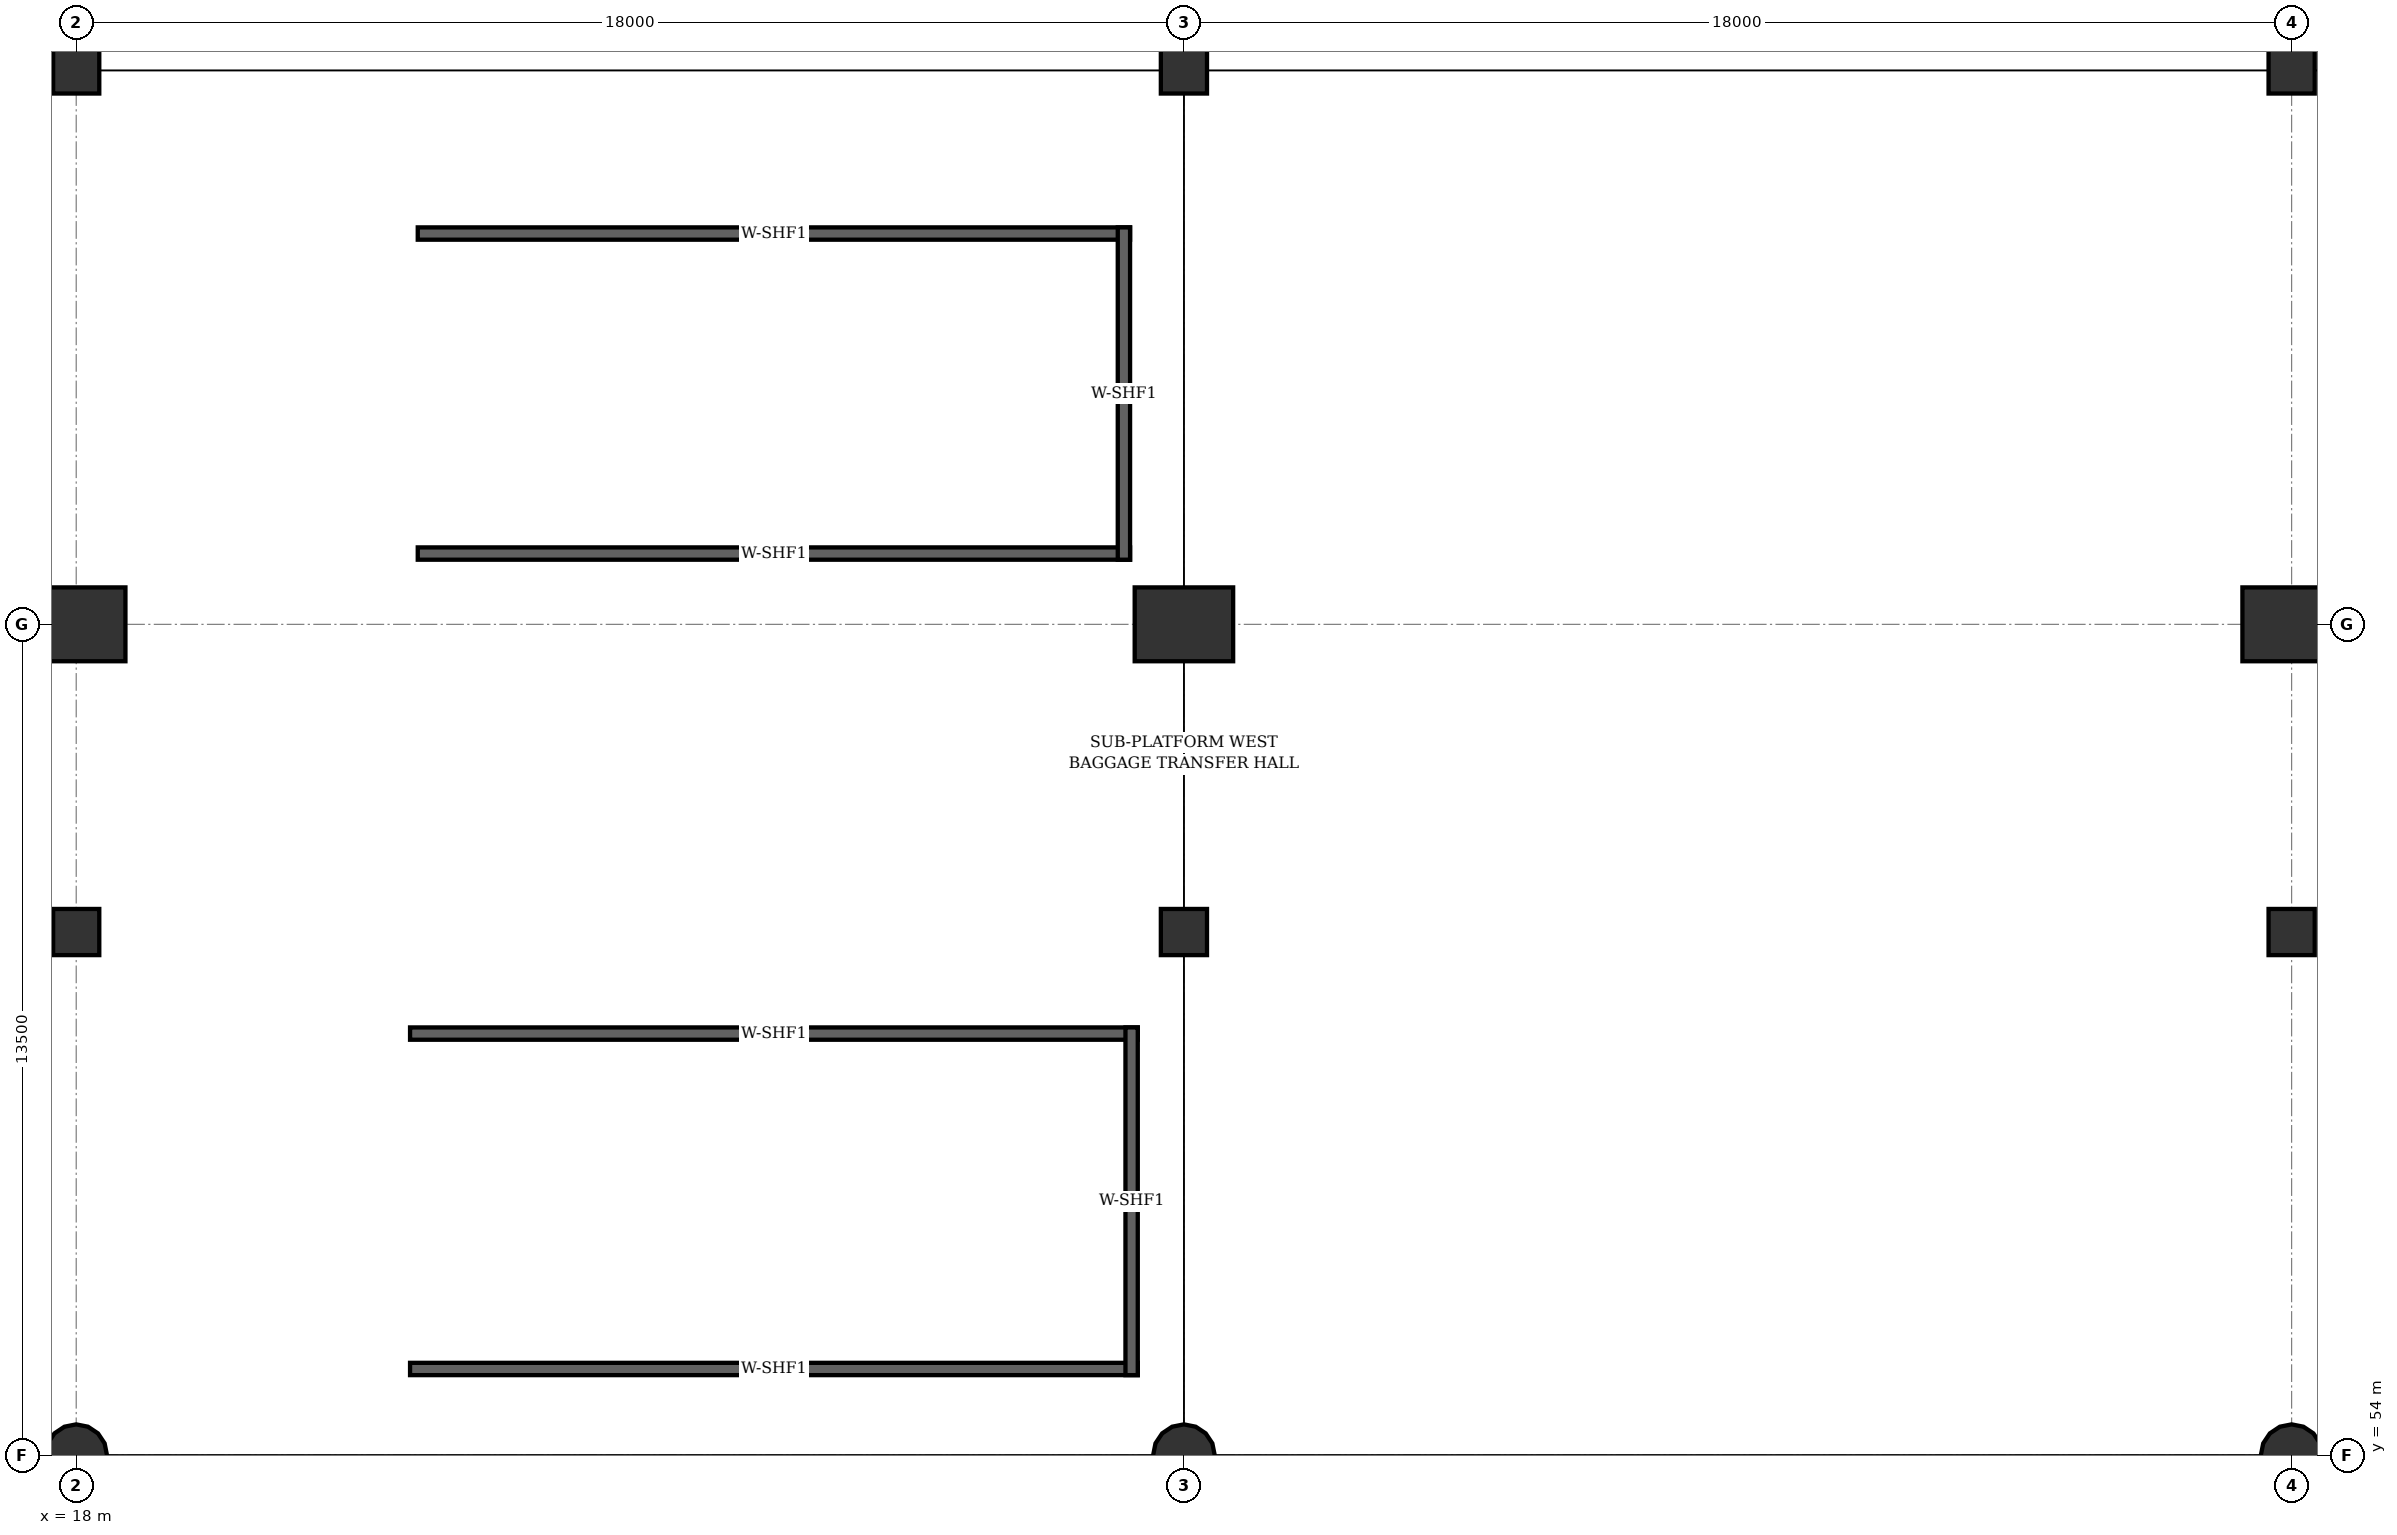
"""IFC4 building model, lengths in metres.
Left out: names, types, materials, properties, quantities, classifications, styles, units other than length and angle.
Written with IfcOpenShell. Run it as: python <this file> out.ifc"""

import sys

from ifc_helpers import new_model, si_unit, direction, frame, frame_2d, origin, origin_2d, place, context, subcontext, project, spatial, rectangle, circle, extrude, element, save


model = new_model("IFC4")
c1 = context("Model", 3, precision=1e-05, world=origin(), true_north=direction((0.0, 1.0)))
c2 = subcontext(c1, "Body", "Model", "MODEL_VIEW")
j1 = project(units=[si_unit("LENGTHUNIT", "METRE"), si_unit("PLANEANGLEUNIT", "RADIAN")], contexts=[c1])
p1 = place(None, origin())
s1 = spatial("IfcSite", under=j1, at=p1, CompositionType="ELEMENT")
p2 = place(p1, origin())
s2 = spatial("IfcBuilding", under=s1, at=p2, CompositionType="ELEMENT")
p3 = place(p2, frame((0.0, 0.0, -5.4)))
s3 = spatial("IfcBuildingStorey", under=s2, at=p3, CompositionType="ELEMENT", Elevation=-5.4)
p4 = place(p3, frame((18.0, 54.0, 0.0), z_axis=(0.0, 0.0, 1.0), x_axis=(1.0, 0.0, 0.0)))
e1 = element("IfcColumn", 1, at=p4, inside=s3, PredefinedType="COLUMN", context=c2, shape_type="SweptSolid", body=[
    extrude(circle(Radius=0.5, at=origin_2d()), origin(), (0.0, 0.0, 1.0), 5.4),
])
p5 = place(p3, frame((18.0, 67.5, 0.0), z_axis=(0.0, 0.0, 1.0), x_axis=(1.0, 0.0, 0.0)))
e2 = element("IfcColumn", 2, at=p5, inside=s3, PredefinedType="COLUMN", context=c2, shape_type="SweptSolid", body=[
    extrude(rectangle(XDim=1.6, YDim=1.2, at=origin_2d()), origin(), (0.0, 0.0, 1.0), 5.4),
])
p6 = place(p3, frame((36.0, 54.0, 0.0), z_axis=(0.0, 0.0, 1.0), x_axis=(1.0, 0.0, 0.0)))
e3 = element("IfcColumn", 3, at=p6, inside=s3, PredefinedType="COLUMN", context=c2, shape_type="SweptSolid", body=[
    extrude(circle(Radius=0.5, at=origin_2d()), origin(), (0.0, 0.0, 1.0), 5.4),
])
p7 = place(p3, frame((36.0, 67.5, 0.0), z_axis=(0.0, 0.0, 1.0), x_axis=(1.0, 0.0, 0.0)))
e4 = element("IfcColumn", 4, at=p7, inside=s3, PredefinedType="COLUMN", context=c2, shape_type="SweptSolid", body=[
    extrude(rectangle(XDim=1.6, YDim=1.2, at=origin_2d()), origin(), (0.0, 0.0, 1.0), 5.4),
])
p8 = place(p3, frame((54.0, 54.0, 0.0), z_axis=(0.0, 0.0, 1.0), x_axis=(1.0, 0.0, 0.0)))
e5 = element("IfcColumn", 5, at=p8, inside=s3, PredefinedType="COLUMN", context=c2, shape_type="SweptSolid", body=[
    extrude(circle(Radius=0.5, at=origin_2d()), origin(), (0.0, 0.0, 1.0), 5.4),
])
p9 = place(p3, frame((54.0, 67.5, 0.0), z_axis=(0.0, 0.0, 1.0), x_axis=(1.0, 0.0, 0.0)))
e6 = element("IfcColumn", 6, at=p9, inside=s3, PredefinedType="COLUMN", context=c2, shape_type="SweptSolid", body=[
    extrude(rectangle(XDim=1.6, YDim=1.2, at=origin_2d()), origin(), (0.0, 0.0, 1.0), 5.4),
])
for number, where, z_axis, x_axis in (
    (7, (18.0, 62.5, 0.0), (0.0, 0.0, 1.0), (1.0, 0.0, 0.0)),
    (8, (36.0, 62.5, 0.0), (0.0, 0.0, 1.0), (1.0, 0.0, 0.0)),
    (9, (54.0, 62.5, 0.0), (0.0, 0.0, 1.0), (1.0, 0.0, 0.0)),
):
    element("IfcColumn", number, at=place(p3, frame(where, z_axis=z_axis, x_axis=x_axis)), inside=s3, PredefinedType="COLUMN", context=c2, shape_type="SweptSolid", body=[
        extrude(rectangle(XDim=0.75, YDim=0.75, at=origin_2d()), origin(), (0.0, 0.0, 1.0), 5.02),
    ])
for number, where, z_axis, x_axis in (
    (10, (18.0, 76.5, 0.0), (0.0, 0.0, 1.0), (1.0, 0.0, 0.0)),
    (11, (36.0, 76.5, 0.0), (0.0, 0.0, 1.0), (1.0, 0.0, 0.0)),
    (12, (54.0, 76.5, 0.0), (0.0, 0.0, 1.0), (1.0, 0.0, 0.0)),
):
    element("IfcColumn", number, at=place(p3, frame(where, z_axis=z_axis, x_axis=x_axis)), inside=s3, PredefinedType="COLUMN", context=c2, shape_type="SweptSolid", body=[
        extrude(rectangle(XDim=0.75, YDim=0.75, at=origin_2d()), origin(), (0.0, 0.0, 1.0), 3.5),
    ])
for number, where, z_axis, x_axis in (
    (13, (23.425, 55.4, 0.0), (0.0, 0.0, 1.0), (1.0, 0.0, 0.0)),
    (14, (35.25, 60.85, 0.0), (0.0, 0.0, 1.0), (-1.0, 0.0, 0.0)),
):
    element("IfcWall", number, at=place(p3, frame(where, z_axis=z_axis, x_axis=x_axis)), inside=s3, PredefinedType="SOLIDWALL", context=c2, shape_type="SweptSolid", body=[
        extrude(rectangle(XDim=11.825, YDim=0.2, at=frame_2d((5.913, 0.0))), origin(), (0.0, 0.0, 1.0), 5.02),
    ])
p10 = place(p3, frame((35.15, 55.3, 0.0), z_axis=(0.0, 0.0, 1.0), x_axis=(0.0, 1.0, 0.0)))
e15 = element("IfcWall", 15, at=p10, inside=s3, PredefinedType="SOLIDWALL", context=c2, shape_type="SweptSolid", body=[
    extrude(rectangle(XDim=5.65, YDim=0.2, at=frame_2d((2.825, 0.0))), origin(), (0.0, 0.0, 1.0), 5.02),
])
for number, where, z_axis, x_axis in (
    (16, (23.55, 68.65, 0.0), (0.0, 0.0, 1.0), (1.0, 0.0, 0.0)),
    (17, (35.125, 73.85, 0.0), (0.0, 0.0, 1.0), (-1.0, 0.0, 0.0)),
):
    element("IfcWall", number, at=place(p3, frame(where, z_axis=z_axis, x_axis=x_axis)), inside=s3, PredefinedType="SOLIDWALL", context=c2, shape_type="SweptSolid", body=[
        extrude(rectangle(XDim=11.575, YDim=0.2, at=frame_2d((5.788, 0.0))), origin(), (0.0, 0.0, 1.0), 5.02),
    ])
p11 = place(p3, frame((35.025, 68.55, 0.0), z_axis=(0.0, 0.0, 1.0), x_axis=(0.0, 1.0, 0.0)))
e18 = element("IfcWall", 18, at=p11, inside=s3, PredefinedType="SOLIDWALL", context=c2, shape_type="SweptSolid", body=[
    extrude(rectangle(XDim=5.4, YDim=0.2, at=frame_2d((2.7, 0.0))), origin(), (0.0, 0.0, 1.0), 5.02),
])
save(model, sys.argv[1])
